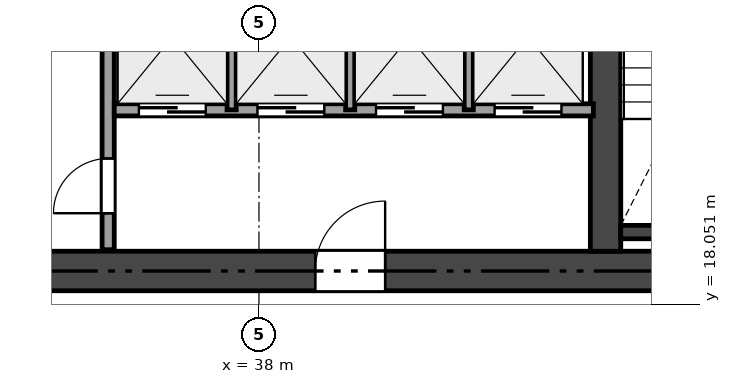
"""IFC4 building model, lengths in metres.
Left out: names, types, materials, properties, quantities, classifications, styles, units other than length and angle.
Written with IfcOpenShell. Run it as: python <this file> out.ifc"""

import sys

from ifc_helpers import new_model, si_unit, direction, frame, frame_2d, origin, place, context, subcontext, project, spatial, rectangle, extrude, element, fill, save


model = new_model("IFC4")
c1 = context("Model", 3, precision=1e-05, world=origin(), true_north=direction((0.0, 1.0)))
c2 = subcontext(c1, "Body", "Model", "MODEL_VIEW")
j1 = project(units=[si_unit("LENGTHUNIT", "METRE"), si_unit("PLANEANGLEUNIT", "RADIAN")], contexts=[c1])
p1 = place(None, origin())
s1 = spatial("IfcSite", under=j1, at=p1, CompositionType="ELEMENT")
p2 = place(p1, origin())
s2 = spatial("IfcBuilding", under=s1, at=p2, CompositionType="ELEMENT")
p3 = place(p2, frame((0.0, 0.0, 16.2)))
s3 = spatial("IfcBuildingStorey", under=s2, at=p3, CompositionType="ELEMENT", Elevation=16.2)
p4 = place(p3, frame((26.475, 18.6, 0.0), z_axis=(0.0, 0.0, 1.0), x_axis=(1.0, 0.0, 0.0)))
e1 = element("IfcWall", 1, at=p4, inside=s3, PredefinedType="SHEAR", context=c2, shape_type="SweptSolid", body=[
    extrude(rectangle(XDim=21.45, YDim=0.65, at=frame_2d((10.725, 0.0))), origin(), (0.0, 0.0, 1.0), 4.98),
])
p5 = place(p4, frame((12.45, 0.0, 0.0)))
e2 = element("IfcOpeningElement", 2, at=p5, cuts=e1, PredefinedType="OPENING", context=c2, shape_type="SweptSolid", body=[
    extrude(rectangle(XDim=1.15, YDim=2.15, at=frame_2d((0.575, 1.075))), frame((0.0, 0.335, 0.0), z_axis=(0.0, -1.0, 0.0), x_axis=(1.0, 0.0, 0.0)), (0.0, 0.0, 1.0), 0.67),
])
p6 = place(p4, frame((5.275, 0.0, 0.0)))
e3 = element("IfcOpeningElement", 3, at=p6, cuts=e1, PredefinedType="OPENING", context=c2, shape_type="SweptSolid", body=[
    extrude(rectangle(XDim=0.9, YDim=2.1, at=frame_2d((0.45, 1.05))), frame((0.0, 0.335, 0.0), z_axis=(0.0, -1.0, 0.0), x_axis=(1.0, 0.0, 0.0)), (0.0, 0.0, 1.0), 0.67),
])
p7 = place(p3, frame((43.7, 18.925, 0.0), z_axis=(0.0, 0.0, 1.0), x_axis=(0.0, 1.0, 0.0)))
e4 = element("IfcWall", 4, at=p7, inside=s3, PredefinedType="SHEAR", context=c2, shape_type="SweptSolid", body=[
    extrude(rectangle(XDim=14.95, YDim=0.5, at=frame_2d((7.475, 0.0))), origin(), (0.0, 0.0, 1.0), 4.98),
])
p8 = place(p7, frame((8.075, 0.0, 0.0)))
e5 = element("IfcOpeningElement", 5, at=p8, cuts=e4, PredefinedType="OPENING", context=c2, shape_type="SweptSolid", body=[
    extrude(rectangle(XDim=0.9, YDim=2.1, at=frame_2d((0.45, 1.05))), frame((0.0, 0.26, 0.0), z_axis=(0.0, -1.0, 0.0), x_axis=(1.0, 0.0, 0.0)), (0.0, 0.0, 1.0), 0.52),
])
p9 = place(p3, frame((43.95, 19.24, 0.0), z_axis=(0.0, 0.0, 1.0), x_axis=(1.0, 0.0, 0.0)))
e6 = element("IfcWall", 6, at=p9, inside=s3, PredefinedType="SHEAR", context=c2, shape_type="SweptSolid", body=[
    extrude(rectangle(XDim=3.325, YDim=0.22, at=frame_2d((1.663, 0.0))), origin(), (0.0, 0.0, 1.0), 4.98),
])
p10 = place(p3, frame((35.52, 18.95, 0.0), z_axis=(0.0, 0.0, 1.0), x_axis=(0.0, 1.0, 0.0)))
e7 = element("IfcWall", 7, at=p10, inside=s3, PredefinedType="SOLIDWALL", context=c2, shape_type="SweptSolid", body=[
    extrude(rectangle(XDim=14.9, YDim=0.2, at=frame_2d((7.45, 0.0))), origin(), (0.0, 0.0, 1.0), 4.501),
])
p11 = place(p10, frame((7.755, 0.0, 0.0)))
e8 = element("IfcOpeningElement", 8, at=p11, cuts=e7, PredefinedType="OPENING", context=c2, shape_type="SweptSolid", body=[
    extrude(rectangle(XDim=0.95, YDim=2.15, at=frame_2d((0.475, 1.075))), frame((0.0, 0.11, 0.0), z_axis=(0.0, -1.0, 0.0), x_axis=(1.0, 0.0, 0.0)), (0.0, 0.0, 1.0), 0.22),
])
p12 = place(p10, frame((0.6, 0.0, 0.0)))
e9 = element("IfcOpeningElement", 9, at=p12, cuts=e7, PredefinedType="OPENING", context=c2, shape_type="SweptSolid", body=[
    extrude(rectangle(XDim=0.9, YDim=2.1, at=frame_2d((0.45, 1.05))), frame((0.0, 0.11, 0.0), z_axis=(0.0, -1.0, 0.0), x_axis=(1.0, 0.0, 0.0)), (0.0, 0.0, 1.0), 0.22),
])
p13 = place(p3, frame((35.62, 21.25, 0.0), z_axis=(0.0, 0.0, 1.0), x_axis=(1.0, 0.0, 0.0)))
e10 = element("IfcWall", 10, at=p13, inside=s3, PredefinedType="SOLIDWALL", context=c2, shape_type="SweptSolid", body=[
    extrude(rectangle(XDim=7.88, YDim=0.2, at=frame_2d((3.94, 0.0))), origin(), (0.0, 0.0, 1.0), 4.98),
])
p14 = place(p13, frame((0.405, 0.0, 0.0)))
e11 = element("IfcOpeningElement", 11, at=p14, cuts=e10, PredefinedType="OPENING", context=c2, shape_type="SweptSolid", body=[
    extrude(rectangle(XDim=1.1, YDim=2.15, at=frame_2d((0.55, 1.075))), frame((0.0, 0.11, 0.0), z_axis=(0.0, -1.0, 0.0), x_axis=(1.0, 0.0, 0.0)), (0.0, 0.0, 1.0), 0.22),
])
p15 = place(p13, frame((2.355, 0.0, 0.0)))
e12 = element("IfcOpeningElement", 12, at=p15, cuts=e10, PredefinedType="OPENING", context=c2, shape_type="SweptSolid", body=[
    extrude(rectangle(XDim=1.1, YDim=2.15, at=frame_2d((0.55, 1.075))), frame((0.0, 0.11, 0.0), z_axis=(0.0, -1.0, 0.0), x_axis=(1.0, 0.0, 0.0)), (0.0, 0.0, 1.0), 0.22),
])
p16 = place(p13, frame((4.305, 0.0, 0.0)))
e13 = element("IfcOpeningElement", 13, at=p16, cuts=e10, PredefinedType="OPENING", context=c2, shape_type="SweptSolid", body=[
    extrude(rectangle(XDim=1.1, YDim=2.15, at=frame_2d((0.55, 1.075))), frame((0.0, 0.11, 0.0), z_axis=(0.0, -1.0, 0.0), x_axis=(1.0, 0.0, 0.0)), (0.0, 0.0, 1.0), 0.22),
])
p17 = place(p13, frame((6.255, 0.0, 0.0)))
e14 = element("IfcOpeningElement", 14, at=p17, cuts=e10, PredefinedType="OPENING", context=c2, shape_type="SweptSolid", body=[
    extrude(rectangle(XDim=1.1, YDim=2.15, at=frame_2d((0.55, 1.075))), frame((0.0, 0.11, 0.0), z_axis=(0.0, -1.0, 0.0), x_axis=(1.0, 0.0, 0.0)), (0.0, 0.0, 1.0), 0.22),
])
for number, where, z_axis, x_axis in (
    (15, (37.55, 21.25, 0.0), (0.0, 0.0, 1.0), (0.0, 1.0, 0.0)),
    (16, (39.5, 21.25, 0.0), (0.0, 0.0, 1.0), (0.0, 1.0, 0.0)),
    (17, (41.45, 21.25, 0.0), (0.0, 0.0, 1.0), (0.0, 1.0, 0.0)),
):
    element("IfcWall", number, at=place(p3, frame(where, z_axis=z_axis, x_axis=x_axis)), inside=s3, PredefinedType="PARTITIONING", context=c2, shape_type="SweptSolid", body=[
        extrude(rectangle(XDim=2.4, YDim=0.15, at=frame_2d((1.2, 0.0))), origin(), (0.0, 0.0, 1.0), 4.501),
    ])
p18 = place(p5, origin())
e18 = element("IfcDoor", 18, at=p18, inside=s3, OperationType="SINGLE_SWING_RIGHT", PredefinedType="DOOR", context=c2, shape_type="SweptSolid", body=[
    extrude(rectangle(XDim=1.15, YDim=2.15, at=frame_2d((0.575, 1.075))), frame((0.0, 0.025, 0.0), z_axis=(0.0, -1.0, 0.0), x_axis=(1.0, 0.0, 0.0)), (0.0, 0.0, 1.0), 0.05),
])
fill(e2, e18)
p19 = place(p12, origin())
e19 = element("IfcDoor", 19, at=p19, inside=s3, OperationType="SINGLE_SWING_LEFT", PredefinedType="DOOR", context=c2, shape_type="SweptSolid", body=[
    extrude(rectangle(XDim=0.9, YDim=2.1, at=frame_2d((0.45, 1.05))), frame((0.0, 0.025, 0.0), z_axis=(0.0, -1.0, 0.0), x_axis=(1.0, 0.0, 0.0)), (0.0, 0.0, 1.0), 0.05),
])
fill(e9, e19)
p20 = place(p14, origin())
e20 = element("IfcDoor", 20, at=p20, inside=s3, OperationType="SLIDING_TO_LEFT", PredefinedType="DOOR", context=c2, shape_type="SweptSolid", body=[
    extrude(rectangle(XDim=1.1, YDim=2.15, at=frame_2d((0.55, 1.075))), frame((0.0, 0.025, 0.0), z_axis=(0.0, -1.0, 0.0), x_axis=(1.0, 0.0, 0.0)), (0.0, 0.0, 1.0), 0.05),
])
fill(e11, e20)
p21 = place(p15, origin())
e21 = element("IfcDoor", 21, at=p21, inside=s3, OperationType="SLIDING_TO_LEFT", PredefinedType="DOOR", context=c2, shape_type="SweptSolid", body=[
    extrude(rectangle(XDim=1.1, YDim=2.15, at=frame_2d((0.55, 1.075))), frame((0.0, 0.025, 0.0), z_axis=(0.0, -1.0, 0.0), x_axis=(1.0, 0.0, 0.0)), (0.0, 0.0, 1.0), 0.05),
])
fill(e12, e21)
p22 = place(p16, origin())
e22 = element("IfcDoor", 22, at=p22, inside=s3, OperationType="SLIDING_TO_LEFT", PredefinedType="DOOR", context=c2, shape_type="SweptSolid", body=[
    extrude(rectangle(XDim=1.1, YDim=2.15, at=frame_2d((0.55, 1.075))), frame((0.0, 0.025, 0.0), z_axis=(0.0, -1.0, 0.0), x_axis=(1.0, 0.0, 0.0)), (0.0, 0.0, 1.0), 0.05),
])
fill(e13, e22)
p23 = place(p17, origin())
e23 = element("IfcDoor", 23, at=p23, inside=s3, OperationType="SLIDING_TO_LEFT", PredefinedType="DOOR", context=c2, shape_type="SweptSolid", body=[
    extrude(rectangle(XDim=1.1, YDim=2.15, at=frame_2d((0.55, 1.075))), frame((0.0, 0.025, 0.0), z_axis=(0.0, -1.0, 0.0), x_axis=(1.0, 0.0, 0.0)), (0.0, 0.0, 1.0), 0.05),
])
fill(e14, e23)
save(model, sys.argv[1])
